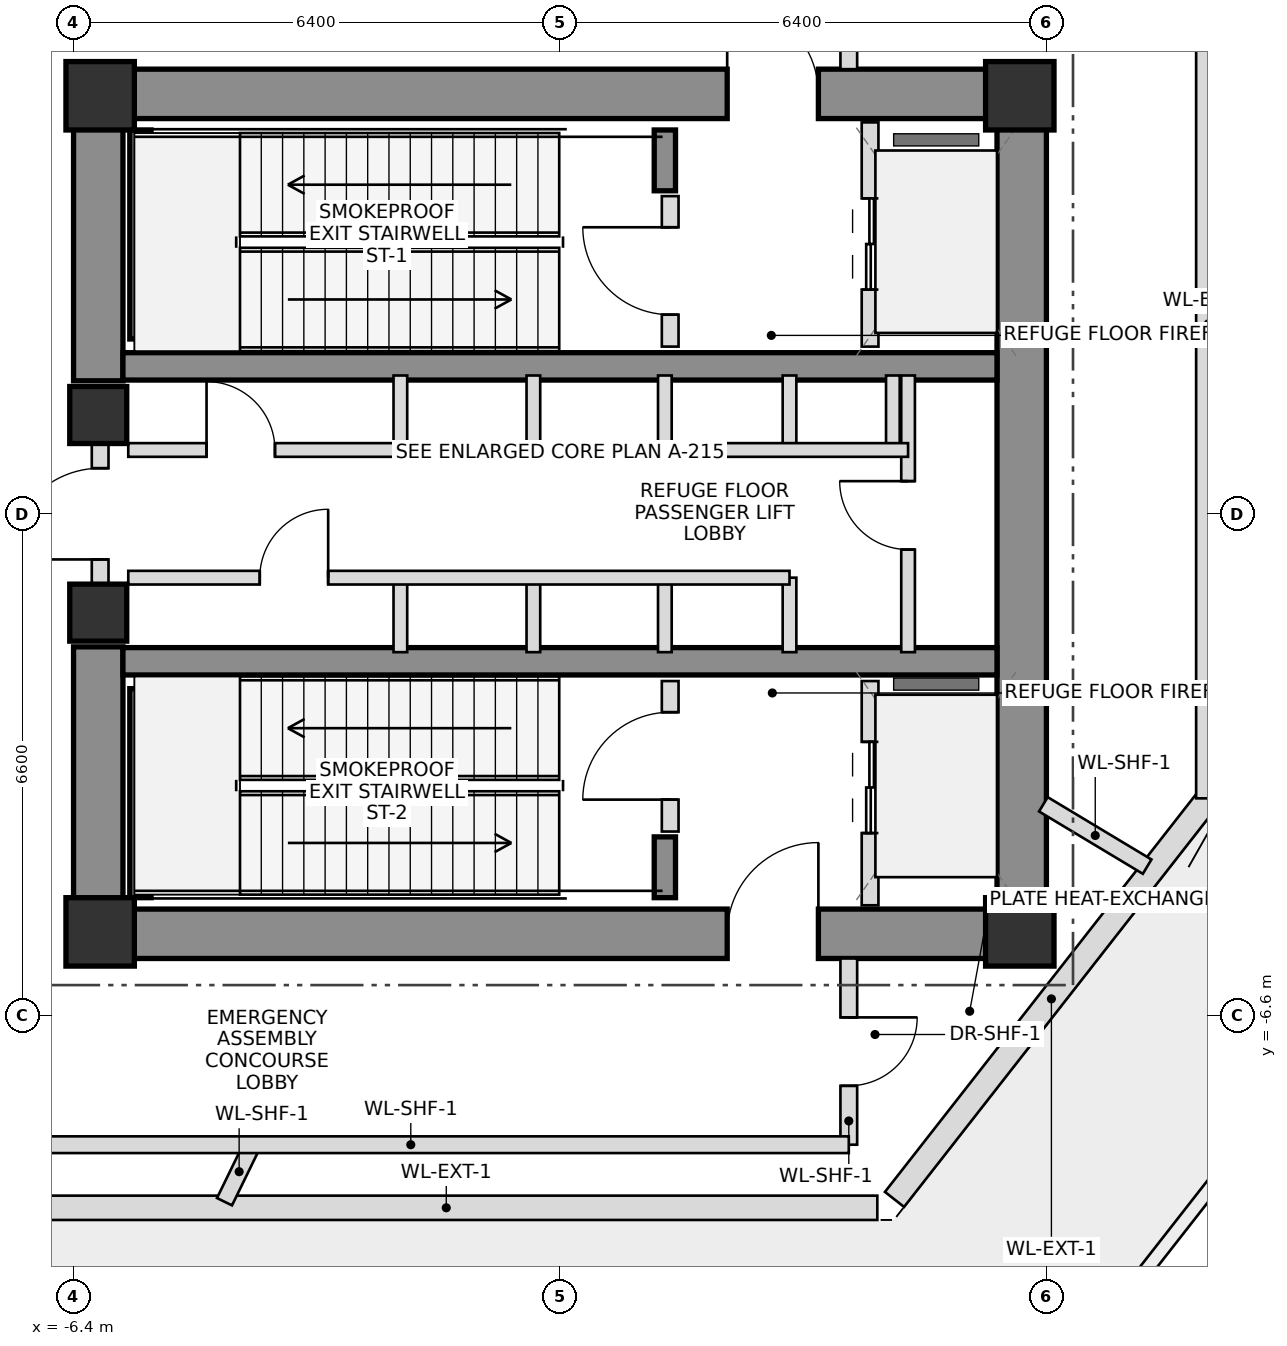
"""IFC4 building model, lengths in metres.
Left out: names, types, materials, properties, quantities, classifications, styles, units other than length and angle.
Written with IfcOpenShell. Run it as: python <this file> out.ifc"""

import sys

from ifc_helpers import new_model, si_unit, direction, frame, frame_2d, origin, origin_2d, place, context, subcontext, project, spatial, rectangle, extrude, source, transform, mapped, element, fill, save


model = new_model("IFC4")
c1 = context("Model", 3, precision=1e-05, world=origin(), true_north=direction((0.0, 1.0)))
c2 = subcontext(c1, "Body", "Model", "MODEL_VIEW")
j1 = project(units=[si_unit("LENGTHUNIT", "METRE"), si_unit("PLANEANGLEUNIT", "RADIAN")], contexts=[c1])
p1 = place(None, origin())
s1 = spatial("IfcSite", under=j1, at=p1, CompositionType="ELEMENT")
p2 = place(p1, origin())
s2 = spatial("IfcBuilding", under=s1, at=p2, CompositionType="ELEMENT")
p3 = place(p2, frame((0.0, 0.0, 153.65)))
s3 = spatial("IfcBuildingStorey", under=s2, at=p3, CompositionType="ELEMENT", Elevation=153.65)
m1 = source(origin(), c2, "Body", "SweptSolid", [
    extrude(rectangle(XDim=0.9, YDim=0.9, at=origin_2d()), origin(), (0.0, 0.0, 1.0), 5.1),
])
for number, where, z_axis, x_axis in (
    (1, (-6.05, -5.5, 0.0), (0.0, 0.0, 1.0), (1.0, 0.0, 0.0)),
    (2, (6.05, -5.5, 0.0), (0.0, 0.0, 1.0), (1.0, 0.0, 0.0)),
    (3, (6.05, 5.5, 0.0), (0.0, 0.0, 1.0), (1.0, 0.0, 0.0)),
    (4, (-6.05, 5.5, 0.0), (0.0, 0.0, 1.0), (1.0, 0.0, 0.0)),
):
    element("IfcColumn", number, at=place(p3, frame(where, z_axis=z_axis, x_axis=x_axis)), inside=s3, PredefinedType="COLUMN", context=c2, shape_type="MappedRepresentation", body=[
        mapped(m1, transform((0.0, 0.0, 0.0), scale=1.0)),
    ])
p4 = place(p3, frame((-6.4, 5.525, 0.0), z_axis=(0.0, 0.0, 1.0), x_axis=(1.0, 0.0, 0.0)))
e5 = element("IfcWall", 5, at=p4, inside=s3, PredefinedType="SHEAR", context=c2, shape_type="SweptSolid", body=[
    extrude(rectangle(XDim=12.8, YDim=0.65, at=frame_2d((6.4, 0.0))), origin(), (0.0, 0.0, 1.0), 5.1),
])
p5 = place(p4, frame((8.6, 0.0, 0.0)))
e6 = element("IfcOpeningElement", 6, at=p5, cuts=e5, PredefinedType="OPENING", context=c2, shape_type="SweptSolid", body=[
    extrude(rectangle(XDim=1.2, YDim=2.2, at=frame_2d((0.6, 1.1))), frame((0.0, 0.335, 0.0), z_axis=(0.0, -1.0, 0.0), x_axis=(1.0, 0.0, 0.0)), (0.0, 0.0, 1.0), 0.67),
])
p6 = place(p3, frame((-6.4, -5.525, 0.0), z_axis=(0.0, 0.0, 1.0), x_axis=(1.0, 0.0, 0.0)))
e7 = element("IfcWall", 7, at=p6, inside=s3, PredefinedType="SHEAR", context=c2, shape_type="SweptSolid", body=[
    extrude(rectangle(XDim=12.8, YDim=0.65, at=frame_2d((6.4, 0.0))), origin(), (0.0, 0.0, 1.0), 5.1),
])
p7 = place(p6, frame((8.6, 0.0, 0.0)))
e8 = element("IfcOpeningElement", 8, at=p7, cuts=e7, PredefinedType="OPENING", context=c2, shape_type="SweptSolid", body=[
    extrude(rectangle(XDim=1.2, YDim=2.2, at=frame_2d((0.6, 1.1))), frame((0.0, 0.335, 0.0), z_axis=(0.0, -1.0, 0.0), x_axis=(1.0, 0.0, 0.0)), (0.0, 0.0, 1.0), 0.67),
])
p8 = place(p3, frame((6.075, -5.2, 0.0), z_axis=(0.0, 0.0, 1.0), x_axis=(0.0, 1.0, 0.0)))
e9 = element("IfcWall", 9, at=p8, inside=s3, PredefinedType="SHEAR", context=c2, shape_type="SweptSolid", body=[
    extrude(rectangle(XDim=10.4, YDim=0.65, at=frame_2d((5.2, 0.0))), origin(), (0.0, 0.0, 1.0), 5.1),
])
for number, where, z_axis, x_axis in (
    (10, (-6.075, -5.2, 0.0), (0.0, 0.0, 1.0), (0.0, 1.0, 0.0)),
    (11, (-6.075, 1.75, 0.0), (0.0, 0.0, 1.0), (0.0, 1.0, 0.0)),
):
    element("IfcWall", number, at=place(p3, frame(where, z_axis=z_axis, x_axis=x_axis)), inside=s3, PredefinedType="SHEAR", context=c2, shape_type="SweptSolid", body=[
        extrude(rectangle(XDim=3.45, YDim=0.65, at=frame_2d((1.725, 0.0))), origin(), (0.0, 0.0, 1.0), 5.1),
    ])
for number, where, z_axis, x_axis in (
    (12, (-5.75, 1.94, 0.0), (0.0, 0.0, 1.0), (1.0, 0.0, 0.0)),
    (13, (-5.75, -1.94, 0.0), (0.0, 0.0, 1.0), (1.0, 0.0, 0.0)),
):
    element("IfcWall", number, at=place(p3, frame(where, z_axis=z_axis, x_axis=x_axis)), inside=s3, PredefinedType="SHEAR", context=c2, shape_type="SweptSolid", body=[
        extrude(rectangle(XDim=11.5, YDim=0.36, at=frame_2d((5.75, 0.0))), origin(), (0.0, 0.0, 1.0), 5.1),
    ])
p9 = place(p3, frame((-5.52, 2.3, 0.0), z_axis=(0.0, 0.0, 1.0), x_axis=(0.0, 1.0, 0.0)))
e14 = element("IfcWall", 14, at=p9, inside=s3, PredefinedType="SHEAR", context=c2, shape_type="SweptSolid", body=[
    extrude(rectangle(XDim=2.75, YDim=0.28, at=frame_2d((1.375, 0.0))), origin(), (0.0, 0.0, 1.0), 5.1),
])
p10 = place(p3, frame((1.38, 4.25, 0.0), z_axis=(0.0, 0.0, 1.0), x_axis=(0.0, 1.0, 0.0)))
e15 = element("IfcWall", 15, at=p10, inside=s3, PredefinedType="SHEAR", context=c2, shape_type="SweptSolid", body=[
    extrude(rectangle(XDim=0.8, YDim=0.28, at=frame_2d((0.4, 0.0))), origin(), (0.0, 0.0, 1.0), 5.1),
])
p11 = place(p3, frame((-5.52, -5.05, 0.0), z_axis=(0.0, 0.0, 1.0), x_axis=(0.0, 1.0, 0.0)))
e16 = element("IfcWall", 16, at=p11, inside=s3, PredefinedType="SHEAR", context=c2, shape_type="SweptSolid", body=[
    extrude(rectangle(XDim=2.75, YDim=0.28, at=frame_2d((1.375, 0.0))), origin(), (0.0, 0.0, 1.0), 5.1),
])
p12 = place(p3, frame((1.38, -5.05, 0.0), z_axis=(0.0, 0.0, 1.0), x_axis=(0.0, 1.0, 0.0)))
e17 = element("IfcWall", 17, at=p12, inside=s3, PredefinedType="SHEAR", context=c2, shape_type="SweptSolid", body=[
    extrude(rectangle(XDim=0.8, YDim=0.28, at=frame_2d((0.4, 0.0))), origin(), (0.0, 0.0, 1.0), 5.1),
])
m2 = source(origin(), c2, "Body", "SweptSolid", [
    extrude(rectangle(XDim=0.75, YDim=0.75, at=origin_2d()), origin(), (0.0, 0.0, 1.0), 5.1),
])
for number, where, z_axis, x_axis in (
    (18, (-6.075, -1.3, 0.0), (0.0, 0.0, 1.0), (1.0, 0.0, 0.0)),
    (19, (-6.075, 1.3, 0.0), (0.0, 0.0, 1.0), (1.0, 0.0, 0.0)),
):
    element("IfcColumn", number, at=place(p3, frame(where, z_axis=z_axis, x_axis=x_axis)), inside=s3, PredefinedType="COLUMN", context=c2, shape_type="MappedRepresentation", body=[
        mapped(m2, transform((0.0, 0.0, 0.0), scale=1.0)),
    ])
p13 = place(p3, frame((-6.05, -0.95, 0.0), z_axis=(0.0, 0.0, 1.0), x_axis=(0.0, 1.0, 0.0)))
e20 = element("IfcWall", 20, at=p13, inside=s3, PredefinedType="PLUMBINGWALL", context=c2, shape_type="SweptSolid", body=[
    extrude(rectangle(XDim=1.9, YDim=0.22, at=frame_2d((0.95, 0.0))), origin(), (0.0, 0.0, 1.0), 3.88),
])
p14 = place(p13, frame((0.35, 0.0, 0.0)))
e21 = element("IfcOpeningElement", 21, at=p14, cuts=e20, PredefinedType="OPENING", context=c2, shape_type="SweptSolid", body=[
    extrude(rectangle(XDim=1.2, YDim=2.2, at=frame_2d((0.6, 1.1))), frame((0.0, 0.12, 0.0), z_axis=(0.0, -1.0, 0.0), x_axis=(1.0, 0.0, 0.0)), (0.0, 0.0, 1.0), 0.24),
])
p15 = place(p3, frame((1.45, 2.2, 0.0), z_axis=(0.0, 0.0, 1.0), x_axis=(0.0, 1.0, 0.0)))
e22 = element("IfcWall", 22, at=p15, inside=s3, PredefinedType="PLUMBINGWALL", context=c2, shape_type="SweptSolid", body=[
    extrude(rectangle(XDim=1.98, YDim=0.22, at=frame_2d((0.99, 0.0))), origin(), (0.0, 0.0, 1.0), 4.9),
])
p16 = place(p15, frame((0.42, 0.0, 0.0)))
e23 = element("IfcOpeningElement", 23, at=p16, cuts=e22, PredefinedType="OPENING", context=c2, shape_type="SweptSolid", body=[
    extrude(rectangle(XDim=1.15, YDim=2.15, at=frame_2d((0.575, 1.075))), frame((0.0, 0.12, 0.0), z_axis=(0.0, -1.0, 0.0), x_axis=(1.0, 0.0, 0.0)), (0.0, 0.0, 1.0), 0.24),
])
p17 = place(p3, frame((4.08, 2.2, 0.0), z_axis=(0.0, 0.0, 1.0), x_axis=(0.0, 1.0, 0.0)))
e24 = element("IfcWall", 24, at=p17, inside=s3, PredefinedType="PLUMBINGWALL", context=c2, shape_type="SweptSolid", body=[
    extrude(rectangle(XDim=2.95, YDim=0.22, at=frame_2d((1.475, 0.0))), origin(), (0.0, 0.0, 1.0), 4.9),
])
p18 = place(p17, frame((0.75, 0.0, 0.0)))
e25 = element("IfcOpeningElement", 25, at=p18, cuts=e24, PredefinedType="OPENING", context=c2, shape_type="SweptSolid", body=[
    extrude(rectangle(XDim=1.2, YDim=2.25, at=frame_2d((0.6, 1.125))), frame((0.0, 0.12, 0.0), z_axis=(0.0, -1.0, 0.0), x_axis=(1.0, 0.0, 0.0)), (0.0, 0.0, 1.0), 0.24),
])
p19 = place(p3, frame((1.45, -4.18, 0.0), z_axis=(0.0, 0.0, 1.0), x_axis=(0.0, 1.0, 0.0)))
e26 = element("IfcWall", 26, at=p19, inside=s3, PredefinedType="PLUMBINGWALL", context=c2, shape_type="SweptSolid", body=[
    extrude(rectangle(XDim=1.98, YDim=0.22, at=frame_2d((0.99, 0.0))), origin(), (0.0, 0.0, 1.0), 4.9),
])
p20 = place(p19, frame((0.42, 0.0, 0.0)))
e27 = element("IfcOpeningElement", 27, at=p20, cuts=e26, PredefinedType="OPENING", context=c2, shape_type="SweptSolid", body=[
    extrude(rectangle(XDim=1.15, YDim=2.15, at=frame_2d((0.575, 1.075))), frame((0.0, 0.12, 0.0), z_axis=(0.0, -1.0, 0.0), x_axis=(1.0, 0.0, 0.0)), (0.0, 0.0, 1.0), 0.24),
])
p21 = place(p3, frame((4.08, -5.15, 0.0), z_axis=(0.0, 0.0, 1.0), x_axis=(0.0, 1.0, 0.0)))
e28 = element("IfcWall", 28, at=p21, inside=s3, PredefinedType="PLUMBINGWALL", context=c2, shape_type="SweptSolid", body=[
    extrude(rectangle(XDim=2.95, YDim=0.22, at=frame_2d((1.475, 0.0))), origin(), (0.0, 0.0, 1.0), 4.9),
])
p22 = place(p21, frame((0.95, 0.0, 0.0)))
e29 = element("IfcOpeningElement", 29, at=p22, cuts=e28, PredefinedType="OPENING", context=c2, shape_type="SweptSolid", body=[
    extrude(rectangle(XDim=1.2, YDim=2.25, at=frame_2d((0.6, 1.125))), frame((0.0, 0.12, 0.0), z_axis=(0.0, -1.0, 0.0), x_axis=(1.0, 0.0, 0.0)), (0.0, 0.0, 1.0), 0.24),
])
for number, where, z_axis, x_axis in (
    (30, (-2.1, 0.84, 0.0), (0.0, 0.0, 1.0), (0.0, 1.0, 0.0)),
    (31, (-2.1, -1.82, 0.0), (0.0, 0.0, 1.0), (0.0, 1.0, 0.0)),
    (32, (-0.35, 0.84, 0.0), (0.0, 0.0, 1.0), (0.0, 1.0, 0.0)),
    (33, (-0.35, -1.82, 0.0), (0.0, 0.0, 1.0), (0.0, 1.0, 0.0)),
    (34, (1.38, 0.84, 0.0), (0.0, 0.0, 1.0), (0.0, 1.0, 0.0)),
    (35, (1.38, -1.82, 0.0), (0.0, 0.0, 1.0), (0.0, 1.0, 0.0)),
    (36, (3.02, 0.84, 0.0), (0.0, 0.0, 1.0), (0.0, 1.0, 0.0)),
    (37, (4.38, 0.84, 0.0), (0.0, 0.0, 1.0), (0.0, 1.0, 0.0)),
    (38, (3.02, -1.82, 0.0), (0.0, 0.0, 1.0), (0.0, 1.0, 0.0)),
):
    element("IfcWall", number, at=place(p3, frame(where, z_axis=z_axis, x_axis=x_axis)), inside=s3, PredefinedType="PLUMBINGWALL", context=c2, shape_type="SweptSolid", body=[
        extrude(rectangle(XDim=0.98, YDim=0.18, at=frame_2d((0.49, 0.0))), origin(), (0.0, 0.0, 1.0), 4.9),
    ])
p23 = place(p3, frame((4.58, -1.82, 0.0), z_axis=(0.0, 0.0, 1.0), x_axis=(0.0, 1.0, 0.0)))
e39 = element("IfcWall", 39, at=p23, inside=s3, PredefinedType="PLUMBINGWALL", context=c2, shape_type="SweptSolid", body=[
    extrude(rectangle(XDim=3.64, YDim=0.18, at=frame_2d((1.82, 0.0))), origin(), (0.0, 0.0, 1.0), 4.9),
])
p24 = place(p23, frame((1.35, 0.0, 0.0)))
e40 = element("IfcOpeningElement", 40, at=p24, cuts=e39, PredefinedType="OPENING", context=c2, shape_type="SweptSolid", body=[
    extrude(rectangle(XDim=0.9, YDim=2.05, at=frame_2d((0.45, 1.025))), frame((0.0, 0.1, 0.0), z_axis=(0.0, -1.0, 0.0), x_axis=(1.0, 0.0, 0.0)), (0.0, 0.0, 1.0), 0.2),
])
p25 = place(p3, frame((-5.68, 0.84, 0.0), z_axis=(0.0, 0.0, 1.0), x_axis=(1.0, 0.0, 0.0)))
e41 = element("IfcWall", 41, at=p25, inside=s3, PredefinedType="PLUMBINGWALL", context=c2, shape_type="SweptSolid", body=[
    extrude(rectangle(XDim=10.26, YDim=0.18, at=frame_2d((5.13, 0.0))), origin(), (0.0, 0.0, 1.0), 4.9),
])
p26 = place(p25, frame((1.03, 0.0, 0.0)))
e42 = element("IfcOpeningElement", 42, at=p26, cuts=e41, PredefinedType="OPENING", context=c2, shape_type="SweptSolid", body=[
    extrude(rectangle(XDim=0.9, YDim=2.05, at=frame_2d((0.45, 1.025))), frame((0.0, 0.1, 0.0), z_axis=(0.0, -1.0, 0.0), x_axis=(1.0, 0.0, 0.0)), (0.0, 0.0, 1.0), 0.2),
])
p27 = place(p3, frame((-5.68, -0.84, 0.0), z_axis=(0.0, 0.0, 1.0), x_axis=(1.0, 0.0, 0.0)))
e43 = element("IfcWall", 43, at=p27, inside=s3, PredefinedType="PLUMBINGWALL", context=c2, shape_type="SweptSolid", body=[
    extrude(rectangle(XDim=8.7, YDim=0.18, at=frame_2d((4.35, 0.0))), origin(), (0.0, 0.0, 1.0), 4.9),
])
p28 = place(p27, frame((1.73, 0.0, 0.0)))
e44 = element("IfcOpeningElement", 44, at=p28, cuts=e43, PredefinedType="OPENING", context=c2, shape_type="SweptSolid", body=[
    extrude(rectangle(XDim=0.9, YDim=2.05, at=frame_2d((0.45, 1.025))), frame((0.0, 0.1, 0.0), z_axis=(0.0, -1.0, 0.0), x_axis=(1.0, 0.0, 0.0)), (0.0, 0.0, 1.0), 0.2),
])
p29 = place(p3, frame((8.53, -3.743, 0.0), z_axis=(0.0, 0.0, 1.0), x_axis=(-0.616206069738, -0.787584966602, 0.0)))
e45 = element("IfcWall", 45, at=p29, inside=s3, PredefinedType="SOLIDWALL", context=c2, shape_type="SweptSolid", body=[
    extrude(rectangle(XDim=6.7, YDim=0.32, at=frame_2d((3.35, 0.0))), origin(), (0.0, 0.0, 1.0), 3.555),
])
p30 = place(p3, frame((4.175, -9.13, 0.0), z_axis=(0.0, 0.0, 1.0), x_axis=(-1.0, 0.0, 0.0)))
e46 = element("IfcWall", 46, at=p30, inside=s3, PredefinedType="SOLIDWALL", context=c2, shape_type="SweptSolid", body=[
    extrude(rectangle(XDim=11.343, YDim=0.32, at=frame_2d((5.671, 0.0))), origin(), (0.0, 0.0, 1.0), 4.9),
])
p31 = place(p3, frame((8.53, 8.743, 0.0), z_axis=(0.0, 0.0, 1.0), x_axis=(0.0, -1.0, 0.0)))
e47 = element("IfcWall", 47, at=p31, inside=s3, PredefinedType="SOLIDWALL", context=c2, shape_type="SweptSolid", body=[
    extrude(rectangle(XDim=12.486, YDim=0.32, at=frame_2d((6.243, 0.0))), origin(), (0.0, 0.0, 1.0), 4.9),
])
p32 = place(p3, frame((-4.029, -8.26, 0.0), z_axis=(0.0, 0.0, 1.0), x_axis=(-0.438303234839, -0.898827165994, 0.0)))
e48 = element("IfcWall", 48, at=p32, inside=s3, PredefinedType="PLUMBINGWALL", context=c2, shape_type="SweptSolid", body=[
    extrude(rectangle(XDim=0.879, YDim=0.22, at=frame_2d((0.439, 0.0))), origin(), (0.0, 0.0, 1.0), 4.9),
])
p33 = place(p3, frame((6.36, -3.822, 0.0), z_axis=(0.0, 0.0, 1.0), x_axis=(0.857168152113, -0.515036657922, 0.0)))
e49 = element("IfcWall", 49, at=p33, inside=s3, PredefinedType="PLUMBINGWALL", context=c2, shape_type="SweptSolid", body=[
    extrude(rectangle(XDim=1.593, YDim=0.22, at=frame_2d((0.796, 0.0))), origin(), (0.0, 0.0, 1.0), 4.9),
])
p34 = place(p3, frame((3.8, -5.85, 0.0), z_axis=(0.0, 0.0, 1.0), x_axis=(0.0, -1.0, 0.0)))
e50 = element("IfcWall", 50, at=p34, inside=s3, PredefinedType="PLUMBINGWALL", context=c2, shape_type="SweptSolid", body=[
    extrude(rectangle(XDim=2.45, YDim=0.22, at=frame_2d((1.225, 0.0))), origin(), (0.0, 0.0, 1.0), 4.9),
])
p35 = place(p34, frame((0.775, 0.0, 0.0)))
e51 = element("IfcOpeningElement", 51, at=p35, cuts=e50, PredefinedType="OPENING", context=c2, shape_type="SweptSolid", body=[
    extrude(rectangle(XDim=0.9, YDim=2.05, at=frame_2d((0.45, 1.025))), frame((0.0, 0.12, 0.0), z_axis=(0.0, -1.0, 0.0), x_axis=(1.0, 0.0, 0.0)), (0.0, 0.0, 1.0), 0.24),
])
p36 = place(p3, frame((3.8, -8.3, 0.0), z_axis=(0.0, 0.0, 1.0), x_axis=(-1.0, 0.0, 0.0)))
e52 = element("IfcWall", 52, at=p36, inside=s3, PredefinedType="PLUMBINGWALL", context=c2, shape_type="SweptSolid", body=[
    extrude(rectangle(XDim=11.526, YDim=0.22, at=frame_2d((5.763, 0.0))), origin(), (0.0, 0.0, 1.0), 4.9),
])
p37 = place(p3, frame((3.8, 8.3, 0.0), z_axis=(0.0, 0.0, 1.0), x_axis=(0.0, -1.0, 0.0)))
e53 = element("IfcWall", 53, at=p37, inside=s3, PredefinedType="PLUMBINGWALL", context=c2, shape_type="SweptSolid", body=[
    extrude(rectangle(XDim=2.45, YDim=0.22, at=frame_2d((1.225, 0.0))), origin(), (0.0, 0.0, 1.0), 4.9),
])
p38 = place(p5, origin())
e54 = element("IfcDoor", 54, at=p38, inside=s3, OperationType="SINGLE_SWING_LEFT", PredefinedType="DOOR", context=c2, shape_type="SweptSolid", body=[
    extrude(rectangle(XDim=1.2, YDim=2.2, at=frame_2d((0.6, 1.1))), frame((0.0, 0.025, 0.0), z_axis=(0.0, -1.0, 0.0), x_axis=(1.0, 0.0, 0.0)), (0.0, 0.0, 1.0), 0.05),
])
fill(e6, e54)
p39 = place(p7, origin())
e55 = element("IfcDoor", 55, at=p39, inside=s3, OperationType="SINGLE_SWING_RIGHT", PredefinedType="DOOR", context=c2, shape_type="SweptSolid", body=[
    extrude(rectangle(XDim=1.2, YDim=2.2, at=frame_2d((0.6, 1.1))), frame((0.0, 0.025, 0.0), z_axis=(0.0, -1.0, 0.0), x_axis=(1.0, 0.0, 0.0)), (0.0, 0.0, 1.0), 0.05),
])
fill(e8, e55)
p40 = place(p14, origin())
e56 = element("IfcDoor", 56, at=p40, inside=s3, OperationType="SINGLE_SWING_LEFT", PredefinedType="DOOR", context=c2, shape_type="SweptSolid", body=[
    extrude(rectangle(XDim=1.2, YDim=2.2, at=frame_2d((0.6, 1.1))), frame((0.0, 0.025, 0.0), z_axis=(0.0, -1.0, 0.0), x_axis=(1.0, 0.0, 0.0)), (0.0, 0.0, 1.0), 0.05),
])
fill(e21, e56)
p41 = place(p16, origin())
e57 = element("IfcDoor", 57, at=p41, inside=s3, OperationType="SINGLE_SWING_RIGHT", PredefinedType="DOOR", context=c2, shape_type="SweptSolid", body=[
    extrude(rectangle(XDim=1.15, YDim=2.15, at=frame_2d((0.575, 1.075))), frame((0.0, 0.025, 0.0), z_axis=(0.0, -1.0, 0.0), x_axis=(1.0, 0.0, 0.0)), (0.0, 0.0, 1.0), 0.05),
])
fill(e23, e57)
p42 = place(p18, origin())
e58 = element("IfcDoor", 58, at=p42, inside=s3, OperationType="DOUBLE_DOOR_SLIDING", PredefinedType="DOOR", context=c2, shape_type="SweptSolid", body=[
    extrude(rectangle(XDim=1.2, YDim=2.25, at=frame_2d((0.6, 1.125))), frame((0.0, 0.025, 0.0), z_axis=(0.0, -1.0, 0.0), x_axis=(1.0, 0.0, 0.0)), (0.0, 0.0, 1.0), 0.05),
])
fill(e25, e58)
p43 = place(p20, origin())
e59 = element("IfcDoor", 59, at=p43, inside=s3, OperationType="SINGLE_SWING_LEFT", PredefinedType="DOOR", context=c2, shape_type="SweptSolid", body=[
    extrude(rectangle(XDim=1.15, YDim=2.15, at=frame_2d((0.575, 1.075))), frame((0.0, 0.025, 0.0), z_axis=(0.0, -1.0, 0.0), x_axis=(1.0, 0.0, 0.0)), (0.0, 0.0, 1.0), 0.05),
])
fill(e27, e59)
p44 = place(p22, origin())
e60 = element("IfcDoor", 60, at=p44, inside=s3, OperationType="DOUBLE_DOOR_SLIDING", PredefinedType="DOOR", context=c2, shape_type="SweptSolid", body=[
    extrude(rectangle(XDim=1.2, YDim=2.25, at=frame_2d((0.6, 1.125))), frame((0.0, 0.025, 0.0), z_axis=(0.0, -1.0, 0.0), x_axis=(1.0, 0.0, 0.0)), (0.0, 0.0, 1.0), 0.05),
])
fill(e29, e60)
p45 = place(p24, origin())
e61 = element("IfcDoor", 61, at=p45, inside=s3, OperationType="SINGLE_SWING_RIGHT", PredefinedType="DOOR", context=c2, shape_type="SweptSolid", body=[
    extrude(rectangle(XDim=0.9, YDim=2.05, at=frame_2d((0.45, 1.025))), frame((0.0, 0.025, 0.0), z_axis=(0.0, -1.0, 0.0), x_axis=(1.0, 0.0, 0.0)), (0.0, 0.0, 1.0), 0.05),
])
fill(e40, e61)
p46 = place(p26, origin())
e62 = element("IfcDoor", 62, at=p46, inside=s3, OperationType="SINGLE_SWING_LEFT", PredefinedType="DOOR", context=c2, shape_type="SweptSolid", body=[
    extrude(rectangle(XDim=0.9, YDim=2.05, at=frame_2d((0.45, 1.025))), frame((0.0, 0.025, 0.0), z_axis=(0.0, -1.0, 0.0), x_axis=(1.0, 0.0, 0.0)), (0.0, 0.0, 1.0), 0.05),
])
fill(e42, e62)
p47 = place(p28, origin())
e63 = element("IfcDoor", 63, at=p47, inside=s3, OperationType="SINGLE_SWING_RIGHT", PredefinedType="DOOR", context=c2, shape_type="SweptSolid", body=[
    extrude(rectangle(XDim=0.9, YDim=2.05, at=frame_2d((0.45, 1.025))), frame((0.0, 0.025, 0.0), z_axis=(0.0, -1.0, 0.0), x_axis=(1.0, 0.0, 0.0)), (0.0, 0.0, 1.0), 0.05),
])
fill(e44, e63)
p48 = place(p35, origin())
e64 = element("IfcDoor", 64, at=p48, inside=s3, OperationType="SINGLE_SWING_LEFT", PredefinedType="DOOR", context=c2, shape_type="SweptSolid", body=[
    extrude(rectangle(XDim=0.9, YDim=2.05, at=frame_2d((0.45, 1.025))), frame((0.0, 0.025, 0.0), z_axis=(0.0, -1.0, 0.0), x_axis=(1.0, 0.0, 0.0)), (0.0, 0.0, 1.0), 0.05),
])
fill(e51, e64)
save(model, sys.argv[1])
